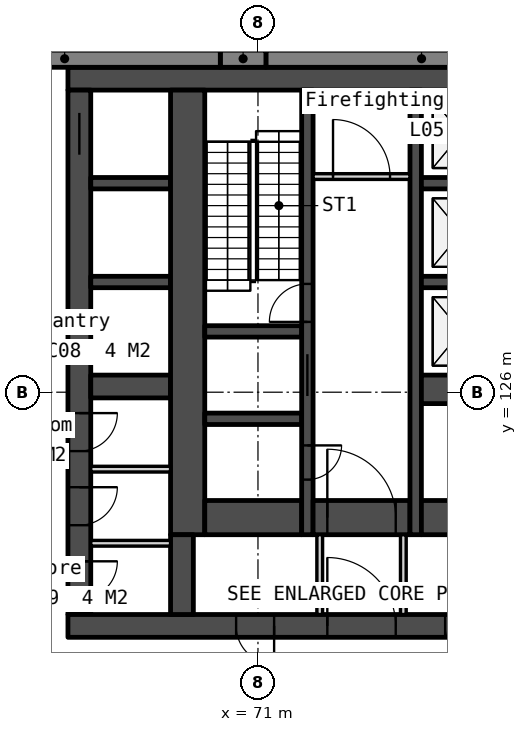
"""IFC4 building model, lengths in metres.
Left out: names, types, materials, properties, quantities, classifications, styles, units other than length and angle.
Written with IfcOpenShell. Run it as: python <this file> out.ifc"""

import sys

from ifc_helpers import new_model, si_unit, direction, frame, frame_2d, origin, place, context, subcontext, project, spatial, rectangle, extrude, element, fill, save


model = new_model("IFC4")
c1 = context("Model", 3, precision=1e-05, world=origin(), true_north=direction((0.0, 1.0)))
c2 = subcontext(c1, "Body", "Model", "MODEL_VIEW")
j1 = project(units=[si_unit("LENGTHUNIT", "METRE"), si_unit("PLANEANGLEUNIT", "RADIAN")], contexts=[c1])
p1 = place(None, origin())
s1 = spatial("IfcSite", under=j1, at=p1, CompositionType="ELEMENT")
p2 = place(p1, origin())
s2 = spatial("IfcBuilding", under=s1, at=p2, CompositionType="ELEMENT")
p3 = place(p2, frame((0.0, 0.0, 30.0)))
s3 = spatial("IfcBuildingStorey", under=s2, at=p3, CompositionType="ELEMENT", Elevation=30.0)
p4 = place(p3, frame((66.0, 134.25, 0.0), z_axis=(0.0, 0.0, 1.0), x_axis=(1.0, 0.0, 0.0)))
e1 = element("IfcWall", 1, at=p4, inside=s3, PredefinedType="SOLIDWALL", context=c2, shape_type="SweptSolid", body=[
    extrude(rectangle(XDim=28.0, YDim=0.6, at=frame_2d((14.0, 0.0))), origin(), (0.0, 0.0, 1.0), 4.8),
])
p5 = place(p3, frame((66.3, 133.95, 0.0), z_axis=(0.0, 0.0, 1.0), x_axis=(0.0, -1.0, 0.0)))
e2 = element("IfcWall", 2, at=p5, inside=s3, PredefinedType="SOLIDWALL", context=c2, shape_type="SweptSolid", body=[
    extrude(rectangle(XDim=13.8, YDim=0.6, at=frame_2d((6.9, 0.0))), origin(), (0.0, 0.0, 1.0), 4.8),
])
p6 = place(p5, frame((0.6, 0.0, 0.0)))
e3 = element("IfcOpeningElement", 3, at=p6, cuts=e2, PredefinedType="OPENING", context=c2, shape_type="SweptSolid", body=[
    extrude(rectangle(XDim=1.1, YDim=2.1, at=frame_2d((0.55, 1.05))), frame((0.0, 0.31, 0.0), z_axis=(0.0, -1.0, 0.0), x_axis=(1.0, 0.0, 0.0)), (0.0, 0.0, 1.0), 0.62),
])
p7 = place(p5, frame((12.4, 0.0, 0.0)))
e4 = element("IfcOpeningElement", 4, at=p7, cuts=e2, PredefinedType="OPENING", context=c2, shape_type="SweptSolid", body=[
    extrude(rectangle(XDim=1.0, YDim=2.1, at=frame_2d((0.5, 1.05))), frame((0.0, 0.31, 0.0), z_axis=(0.0, -1.0, 0.0), x_axis=(1.0, 0.0, 0.0)), (0.0, 0.0, 1.0), 0.62),
])
p8 = place(p5, frame((8.5, 0.0, 0.0)))
e5 = element("IfcOpeningElement", 5, at=p8, cuts=e2, PredefinedType="OPENING", context=c2, shape_type="SweptSolid", body=[
    extrude(rectangle(XDim=1.0, YDim=2.1, at=frame_2d((0.5, 1.05))), frame((0.0, 0.31, 0.0), z_axis=(0.0, -1.0, 0.0), x_axis=(1.0, 0.0, 0.0)), (0.0, 0.0, 1.0), 0.62),
])
p9 = place(p5, frame((10.45, 0.0, 0.0)))
e6 = element("IfcOpeningElement", 6, at=p9, cuts=e2, PredefinedType="OPENING", context=c2, shape_type="SweptSolid", body=[
    extrude(rectangle(XDim=1.0, YDim=2.1, at=frame_2d((0.5, 1.05))), frame((0.0, 0.31, 0.0), z_axis=(0.0, -1.0, 0.0), x_axis=(1.0, 0.0, 0.0)), (0.0, 0.0, 1.0), 0.62),
])
p10 = place(p3, frame((66.0, 119.85, 0.0), z_axis=(0.0, 0.0, 1.0), x_axis=(1.0, 0.0, 0.0)))
e7 = element("IfcWall", 7, at=p10, inside=s3, PredefinedType="SOLIDWALL", context=c2, shape_type="SweptSolid", body=[
    extrude(rectangle(XDim=28.0, YDim=0.6, at=frame_2d((14.0, 0.0))), origin(), (0.0, 0.0, 1.0), 4.8),
])
p11 = place(p10, frame((6.825, 0.0, 0.0)))
e8 = element("IfcOpeningElement", 8, at=p11, cuts=e7, PredefinedType="OPENING", context=c2, shape_type="SweptSolid", body=[
    extrude(rectangle(XDim=1.8, YDim=2.1, at=frame_2d((0.9, 1.05))), frame((0.0, 0.31, 0.0), z_axis=(0.0, -1.0, 0.0), x_axis=(1.0, 0.0, 0.0)), (0.0, 0.0, 1.0), 0.62),
])
p12 = place(p10, frame((15.85, 0.0, 0.0)))
e9 = element("IfcOpeningElement", 9, at=p12, cuts=e7, PredefinedType="OPENING", context=c2, shape_type="SweptSolid", body=[
    extrude(rectangle(XDim=1.5, YDim=2.1, at=frame_2d((0.75, 1.05))), frame((0.0, 0.31, 0.0), z_axis=(0.0, -1.0, 0.0), x_axis=(1.0, 0.0, 0.0)), (0.0, 0.0, 1.0), 0.62),
])
p13 = place(p10, frame((19.375, 0.0, 0.0)))
e10 = element("IfcOpeningElement", 10, at=p13, cuts=e7, PredefinedType="OPENING", context=c2, shape_type="SweptSolid", body=[
    extrude(rectangle(XDim=1.8, YDim=2.1, at=frame_2d((0.9, 1.05))), frame((0.0, 0.31, 0.0), z_axis=(0.0, -1.0, 0.0), x_axis=(1.0, 0.0, 0.0)), (0.0, 0.0, 1.0), 0.62),
])
p14 = place(p10, frame((4.425, 0.0, 0.0)))
e11 = element("IfcOpeningElement", 11, at=p14, cuts=e7, PredefinedType="OPENING", context=c2, shape_type="SweptSolid", body=[
    extrude(rectangle(XDim=1.0, YDim=2.1, at=frame_2d((0.5, 1.05))), frame((0.0, 0.31, 0.0), z_axis=(0.0, -1.0, 0.0), x_axis=(1.0, 0.0, 0.0)), (0.0, 0.0, 1.0), 0.62),
])
p15 = place(p10, frame((9.925, 0.0, 0.0)))
e12 = element("IfcOpeningElement", 12, at=p15, cuts=e7, PredefinedType="OPENING", context=c2, shape_type="SweptSolid", body=[
    extrude(rectangle(XDim=1.0, YDim=2.1, at=frame_2d((0.5, 1.05))), frame((0.0, 0.31, 0.0), z_axis=(0.0, -1.0, 0.0), x_axis=(1.0, 0.0, 0.0)), (0.0, 0.0, 1.0), 0.62),
])
p16 = place(p10, frame((13.125, 0.0, 0.0)))
e13 = element("IfcOpeningElement", 13, at=p16, cuts=e7, PredefinedType="OPENING", context=c2, shape_type="SweptSolid", body=[
    extrude(rectangle(XDim=1.0, YDim=2.1, at=frame_2d((0.5, 1.05))), frame((0.0, 0.31, 0.0), z_axis=(0.0, -1.0, 0.0), x_axis=(1.0, 0.0, 0.0)), (0.0, 0.0, 1.0), 0.62),
])
p17 = place(p10, frame((21.725, 0.0, 0.0)))
e14 = element("IfcOpeningElement", 14, at=p17, cuts=e7, PredefinedType="OPENING", context=c2, shape_type="SweptSolid", body=[
    extrude(rectangle(XDim=1.0, YDim=2.1, at=frame_2d((0.5, 1.05))), frame((0.0, 0.31, 0.0), z_axis=(0.0, -1.0, 0.0), x_axis=(1.0, 0.0, 0.0)), (0.0, 0.0, 1.0), 0.62),
])
p18 = place(p10, frame((23.425, 0.0, 0.0)))
e15 = element("IfcOpeningElement", 15, at=p18, cuts=e7, PredefinedType="OPENING", context=c2, shape_type="SweptSolid", body=[
    extrude(rectangle(XDim=1.0, YDim=2.1, at=frame_2d((0.5, 1.05))), frame((0.0, 0.31, 0.0), z_axis=(0.0, -1.0, 0.0), x_axis=(1.0, 0.0, 0.0)), (0.0, 0.0, 1.0), 0.62),
])
for number, where, z_axis, x_axis in (
    (16, (66.6, 131.5, 0.0), (0.0, 0.0, 1.0), (1.0, 0.0, 0.0)),
    (17, (66.6, 128.9, 0.0), (0.0, 0.0, 1.0), (1.0, 0.0, 0.0)),
):
    element("IfcWall", number, at=place(p3, frame(where, z_axis=z_axis, x_axis=x_axis)), inside=s3, PredefinedType="SOLIDWALL", context=c2, shape_type="SweptSolid", body=[
        extrude(rectangle(XDim=2.1, YDim=0.3, at=frame_2d((1.05, 0.0))), origin(), (0.0, 0.0, 1.0), 4.8),
    ])
p19 = place(p3, frame((66.6, 126.15, 0.0), z_axis=(0.0, 0.0, 1.0), x_axis=(1.0, 0.0, 0.0)))
e18 = element("IfcWall", 18, at=p19, inside=s3, PredefinedType="SOLIDWALL", context=c2, shape_type="SweptSolid", body=[
    extrude(rectangle(XDim=2.1, YDim=0.6, at=frame_2d((1.05, 0.0))), origin(), (0.0, 0.0, 1.0), 4.8),
])
for number, where, z_axis, x_axis in (
    (19, (66.6, 123.975, 0.0), (0.0, 0.0, 1.0), (1.0, 0.0, 0.0)),
    (20, (66.6, 122.025, 0.0), (0.0, 0.0, 1.0), (1.0, 0.0, 0.0)),
):
    element("IfcWall", number, at=place(p3, frame(where, z_axis=z_axis, x_axis=x_axis)), inside=s3, PredefinedType="PARTITIONING", context=c2, shape_type="SweptSolid", body=[
        extrude(rectangle(XDim=2.1, YDim=0.15, at=frame_2d((1.05, 0.0))), origin(), (0.0, 0.0, 1.0), 4.8),
    ])
p20 = place(p3, frame((69.15, 133.95, 0.0), z_axis=(0.0, 0.0, 1.0), x_axis=(0.0, -1.0, 0.0)))
e21 = element("IfcWall", 21, at=p20, inside=s3, PredefinedType="SOLIDWALL", context=c2, shape_type="SweptSolid", body=[
    extrude(rectangle(XDim=11.7, YDim=0.9, at=frame_2d((5.85, 0.0))), origin(), (0.0, 0.0, 1.0), 4.8),
])
p21 = place(p3, frame((69.0, 122.25, 0.0), z_axis=(0.0, 0.0, 1.0), x_axis=(0.0, -1.0, 0.0)))
e22 = element("IfcWall", 22, at=p21, inside=s3, PredefinedType="SOLIDWALL", context=c2, shape_type="SweptSolid", body=[
    extrude(rectangle(XDim=2.1, YDim=0.6, at=frame_2d((1.05, 0.0))), origin(), (0.0, 0.0, 1.0), 4.8),
])
for number, where, z_axis, x_axis in (
    (23, (69.6, 127.6, 0.0), (0.0, 0.0, 1.0), (1.0, 0.0, 0.0)),
    (24, (69.6, 125.3, 0.0), (0.0, 0.0, 1.0), (1.0, 0.0, 0.0)),
):
    element("IfcWall", number, at=place(p3, frame(where, z_axis=z_axis, x_axis=x_axis)), inside=s3, PredefinedType="SOLIDWALL", context=c2, shape_type="SweptSolid", body=[
        extrude(rectangle(XDim=2.55, YDim=0.3, at=frame_2d((1.275, 0.0))), origin(), (0.0, 0.0, 1.0), 4.8),
    ])
p22 = place(p3, frame((69.6, 122.7, 0.0), z_axis=(0.0, 0.0, 1.0), x_axis=(1.0, 0.0, 0.0)))
e25 = element("IfcWall", 25, at=p22, inside=s3, PredefinedType="SOLIDWALL", context=c2, shape_type="SweptSolid", body=[
    extrude(rectangle(XDim=2.55, YDim=0.9, at=frame_2d((1.275, 0.0))), origin(), (0.0, 0.0, 1.0), 4.8),
])
p23 = place(p3, frame((72.3, 133.95, 0.0), z_axis=(0.0, 0.0, 1.0), x_axis=(0.0, -1.0, 0.0)))
e26 = element("IfcWall", 26, at=p23, inside=s3, PredefinedType="SOLIDWALL", context=c2, shape_type="SweptSolid", body=[
    extrude(rectangle(XDim=11.7, YDim=0.3, at=frame_2d((5.85, 0.0))), origin(), (0.0, 0.0, 1.0), 4.8),
])
p24 = place(p23, frame((6.95, 0.0, 0.0)))
e27 = element("IfcOpeningElement", 27, at=p24, cuts=e26, PredefinedType="OPENING", context=c2, shape_type="SweptSolid", body=[
    extrude(rectangle(XDim=1.1, YDim=2.1, at=frame_2d((0.55, 1.05))), frame((0.0, 0.16, 0.0), z_axis=(0.0, -1.0, 0.0), x_axis=(1.0, 0.0, 0.0)), (0.0, 0.0, 1.0), 0.32),
])
p25 = place(p23, frame((9.35, 0.0, 0.0)))
e28 = element("IfcOpeningElement", 28, at=p25, cuts=e26, PredefinedType="OPENING", context=c2, shape_type="SweptSolid", body=[
    extrude(rectangle(XDim=0.9, YDim=2.1, at=frame_2d((0.45, 1.05))), frame((0.0, 0.16, 0.0), z_axis=(0.0, -1.0, 0.0), x_axis=(1.0, 0.0, 0.0)), (0.0, 0.0, 1.0), 0.32),
])
p26 = place(p23, frame((5.1, 0.0, 0.0)))
e29 = element("IfcOpeningElement", 29, at=p26, cuts=e26, PredefinedType="OPENING", context=c2, shape_type="SweptSolid", body=[
    extrude(rectangle(XDim=1.0, YDim=2.1, at=frame_2d((0.5, 1.05))), frame((0.0, 0.16, 0.0), z_axis=(0.0, -1.0, 0.0), x_axis=(1.0, 0.0, 0.0)), (0.0, 0.0, 1.0), 0.32),
])
p27 = place(p3, frame((72.45, 131.675, 0.0), z_axis=(0.0, 0.0, 1.0), x_axis=(1.0, 0.0, 0.0)))
e30 = element("IfcWall", 30, at=p27, inside=s3, PredefinedType="PARTITIONING", context=c2, shape_type="SweptSolid", body=[
    extrude(rectangle(XDim=2.55, YDim=0.15, at=frame_2d((1.275, 0.0))), origin(), (0.0, 0.0, 1.0), 4.8),
])
p28 = place(p27, frame((0.525, 0.0, 0.0)))
e31 = element("IfcOpeningElement", 31, at=p28, cuts=e30, PredefinedType="OPENING", context=c2, shape_type="SweptSolid", body=[
    extrude(rectangle(XDim=1.5, YDim=2.1, at=frame_2d((0.75, 1.05))), frame((0.0, 0.085, 0.0), z_axis=(0.0, -1.0, 0.0), x_axis=(1.0, 0.0, 0.0)), (0.0, 0.0, 1.0), 0.17),
])
p29 = place(p3, frame((72.45, 122.7, 0.0), z_axis=(0.0, 0.0, 1.0), x_axis=(1.0, 0.0, 0.0)))
e32 = element("IfcWall", 32, at=p29, inside=s3, PredefinedType="SOLIDWALL", context=c2, shape_type="SweptSolid", body=[
    extrude(rectangle(XDim=2.55, YDim=0.9, at=frame_2d((1.275, 0.0))), origin(), (0.0, 0.0, 1.0), 4.8),
])
p30 = place(p29, frame((0.375, 0.0, 0.0)))
e33 = element("IfcOpeningElement", 33, at=p30, cuts=e32, PredefinedType="OPENING", context=c2, shape_type="SweptSolid", body=[
    extrude(rectangle(XDim=1.8, YDim=2.1, at=frame_2d((0.9, 1.05))), frame((0.0, 0.46, 0.0), z_axis=(0.0, -1.0, 0.0), x_axis=(1.0, 0.0, 0.0)), (0.0, 0.0, 1.0), 0.92),
])
for number, where, z_axis, x_axis in (
    (34, (72.625, 122.25, 0.0), (0.0, 0.0, 1.0), (0.0, -1.0, 0.0)),
    (35, (74.825, 122.25, 0.0), (0.0, 0.0, 1.0), (0.0, -1.0, 0.0)),
):
    element("IfcWall", number, at=place(p3, frame(where, z_axis=z_axis, x_axis=x_axis)), inside=s3, PredefinedType="PARTITIONING", context=c2, shape_type="SweptSolid", body=[
        extrude(rectangle(XDim=2.1, YDim=0.15, at=frame_2d((1.05, 0.0))), origin(), (0.0, 0.0, 1.0), 4.8),
    ])
p31 = place(p3, frame((75.15, 133.95, 0.0), z_axis=(0.0, 0.0, 1.0), x_axis=(0.0, -1.0, 0.0)))
e36 = element("IfcWall", 36, at=p31, inside=s3, PredefinedType="SOLIDWALL", context=c2, shape_type="SweptSolid", body=[
    extrude(rectangle(XDim=11.7, YDim=0.3, at=frame_2d((5.85, 0.0))), origin(), (0.0, 0.0, 1.0), 4.8),
])
for number, where, z_axis, x_axis in (
    (37, (75.3, 131.5, 0.0), (0.0, 0.0, 1.0), (1.0, 0.0, 0.0)),
    (38, (75.3, 128.9, 0.0), (0.0, 0.0, 1.0), (1.0, 0.0, 0.0)),
):
    element("IfcWall", number, at=place(p3, frame(where, z_axis=z_axis, x_axis=x_axis)), inside=s3, PredefinedType="SOLIDWALL", context=c2, shape_type="SweptSolid", body=[
        extrude(rectangle(XDim=2.1, YDim=0.3, at=frame_2d((1.05, 0.0))), origin(), (0.0, 0.0, 1.0), 4.8),
    ])
p32 = place(p3, frame((75.3, 126.075, 0.0), z_axis=(0.0, 0.0, 1.0), x_axis=(1.0, 0.0, 0.0)))
e39 = element("IfcWall", 39, at=p32, inside=s3, PredefinedType="SOLIDWALL", context=c2, shape_type="SweptSolid", body=[
    extrude(rectangle(XDim=2.1, YDim=0.75, at=frame_2d((1.05, 0.0))), origin(), (0.0, 0.0, 1.0), 4.8),
])
p33 = place(p3, frame((75.3, 122.7, 0.0), z_axis=(0.0, 0.0, 1.0), x_axis=(1.0, 0.0, 0.0)))
e40 = element("IfcWall", 40, at=p33, inside=s3, PredefinedType="SOLIDWALL", context=c2, shape_type="SweptSolid", body=[
    extrude(rectangle(XDim=6.2, YDim=0.9, at=frame_2d((3.1, 0.0))), origin(), (0.0, 0.0, 1.0), 4.8),
])
p34 = place(p3, frame((79.4, 134.775, -0.3), z_axis=(0.0, 0.0, 1.0), x_axis=(-1.0, 0.0, 0.0)))
e41 = element("IfcWall", 41, at=p34, inside=s3, PredefinedType="SOLIDWALL", context=c2, shape_type="SweptSolid", body=[
    extrude(rectangle(XDim=8.191, YDim=0.45, at=frame_2d((4.096, 0.0))), origin(), (0.0, 0.0, 1.0), 4.413),
])
p35 = place(p3, frame((71.209, 134.775, -0.3), z_axis=(0.0, 0.0, 1.0), x_axis=(-1.0, 0.0, 0.0)))
e42 = element("IfcWall", 42, at=p35, inside=s3, PredefinedType="SOLIDWALL", context=c2, shape_type="SweptSolid", body=[
    extrude(rectangle(XDim=1.2, YDim=0.45, at=frame_2d((0.6, 0.0))), origin(), (0.0, 0.0, 1.0), 4.413),
])
p36 = place(p3, frame((70.009, 134.775, -0.3), z_axis=(0.0, 0.0, 1.0), x_axis=(-1.0, 0.0, 0.0)))
e43 = element("IfcWall", 43, at=p36, inside=s3, PredefinedType="SOLIDWALL", context=c2, shape_type="SweptSolid", body=[
    extrude(rectangle(XDim=8.191, YDim=0.45, at=frame_2d((4.096, 0.0))), origin(), (0.0, 0.0, 1.0), 4.413),
])
p37 = place(p3, frame((77.166, 71.679, 0.0), z_axis=(0.0, 0.0, 1.0), x_axis=(-0.500000858155, 0.866024908328, 0.0)))
e44 = element("IfcWall", 44, at=p37, inside=s3, PredefinedType="STANDARD", context=c2, shape_type="SweptSolid", body=[
    extrude(rectangle(XDim=66.294, YDim=1.0, at=frame_2d((33.147, 0.0))), origin(), (0.0, 0.0, 1.0), 0.6),
])
p38 = place(p6, origin())
e45 = element("IfcDoor", 45, at=p38, inside=s3, OperationType="SLIDING_TO_LEFT", PredefinedType="DOOR", context=c2, shape_type="SweptSolid", body=[
    extrude(rectangle(XDim=1.1, YDim=2.1, at=frame_2d((0.55, 1.05))), frame((0.0, 0.025, 0.0), z_axis=(0.0, -1.0, 0.0), x_axis=(1.0, 0.0, 0.0)), (0.0, 0.0, 1.0), 0.05),
])
fill(e3, e45)
p39 = place(p24, origin())
e46 = element("IfcDoor", 46, at=p39, inside=s3, OperationType="SLIDING_TO_LEFT", PredefinedType="DOOR", context=c2, shape_type="SweptSolid", body=[
    extrude(rectangle(XDim=1.1, YDim=2.1, at=frame_2d((0.55, 1.05))), frame((0.0, 0.025, 0.0), z_axis=(0.0, -1.0, 0.0), x_axis=(1.0, 0.0, 0.0)), (0.0, 0.0, 1.0), 0.05),
])
fill(e27, e46)
p40 = place(p30, origin())
e47 = element("IfcDoor", 47, at=p40, inside=s3, OperationType="DOUBLE_DOOR_DOUBLE_SWING", PredefinedType="DOOR", context=c2, shape_type="SweptSolid", body=[
    extrude(rectangle(XDim=1.8, YDim=2.1, at=frame_2d((0.9, 1.05))), frame((0.0, 0.025, 0.0), z_axis=(0.0, -1.0, 0.0), x_axis=(1.0, 0.0, 0.0)), (0.0, 0.0, 1.0), 0.05),
])
fill(e33, e47)
p41 = place(p11, origin())
e48 = element("IfcDoor", 48, at=p41, inside=s3, OperationType="DOUBLE_DOOR_DOUBLE_SWING", PredefinedType="DOOR", context=c2, shape_type="SweptSolid", body=[
    extrude(rectangle(XDim=1.8, YDim=2.1, at=frame_2d((0.9, 1.05))), frame((0.0, 0.025, 0.0), z_axis=(0.0, -1.0, 0.0), x_axis=(1.0, 0.0, 0.0)), (0.0, 0.0, 1.0), 0.05),
])
fill(e8, e48)
p42 = place(p28, origin())
e49 = element("IfcDoor", 49, at=p42, inside=s3, OperationType="DOUBLE_DOOR_DOUBLE_SWING", PredefinedType="DOOR", context=c2, shape_type="SweptSolid", body=[
    extrude(rectangle(XDim=1.5, YDim=2.1, at=frame_2d((0.75, 1.05))), frame((0.0, 0.025, 0.0), z_axis=(0.0, -1.0, 0.0), x_axis=(1.0, 0.0, 0.0)), (0.0, 0.0, 1.0), 0.05),
])
fill(e31, e49)
p43 = place(p25, origin())
e50 = element("IfcDoor", 50, at=p43, inside=s3, OperationType="SINGLE_SWING_LEFT", PredefinedType="DOOR", context=c2, shape_type="SweptSolid", body=[
    extrude(rectangle(XDim=0.9, YDim=2.1, at=frame_2d((0.45, 1.05))), frame((0.0, 0.025, 0.0), z_axis=(0.0, -1.0, 0.0), x_axis=(1.0, 0.0, 0.0)), (0.0, 0.0, 1.0), 0.05),
])
fill(e28, e50)
p44 = place(p14, origin())
e51 = element("IfcDoor", 51, at=p44, inside=s3, OperationType="SINGLE_SWING_RIGHT", PredefinedType="DOOR", context=c2, shape_type="SweptSolid", body=[
    extrude(rectangle(XDim=1.0, YDim=2.1, at=frame_2d((0.5, 1.05))), frame((0.0, 0.025, 0.0), z_axis=(0.0, -1.0, 0.0), x_axis=(1.0, 0.0, 0.0)), (0.0, 0.0, 1.0), 0.05),
])
fill(e11, e51)
p45 = place(p15, origin())
e52 = element("IfcDoor", 52, at=p45, inside=s3, OperationType="SINGLE_SWING_RIGHT", PredefinedType="DOOR", context=c2, shape_type="SweptSolid", body=[
    extrude(rectangle(XDim=1.0, YDim=2.1, at=frame_2d((0.5, 1.05))), frame((0.0, 0.025, 0.0), z_axis=(0.0, -1.0, 0.0), x_axis=(1.0, 0.0, 0.0)), (0.0, 0.0, 1.0), 0.05),
])
fill(e12, e52)
p46 = place(p26, origin())
e53 = element("IfcDoor", 53, at=p46, inside=s3, OperationType="SINGLE_SWING_RIGHT", PredefinedType="DOOR", context=c2, shape_type="SweptSolid", body=[
    extrude(rectangle(XDim=1.0, YDim=2.1, at=frame_2d((0.5, 1.05))), frame((0.0, 0.025, 0.0), z_axis=(0.0, -1.0, 0.0), x_axis=(1.0, 0.0, 0.0)), (0.0, 0.0, 1.0), 0.05),
])
fill(e29, e53)
p47 = place(p7, origin())
e54 = element("IfcDoor", 54, at=p47, inside=s3, OperationType="SINGLE_SWING_LEFT", PredefinedType="DOOR", context=c2, shape_type="SweptSolid", body=[
    extrude(rectangle(XDim=1.0, YDim=2.1, at=frame_2d((0.5, 1.05))), frame((0.0, 0.025, 0.0), z_axis=(0.0, -1.0, 0.0), x_axis=(1.0, 0.0, 0.0)), (0.0, 0.0, 1.0), 0.05),
])
fill(e4, e54)
p48 = place(p8, origin())
e55 = element("IfcDoor", 55, at=p48, inside=s3, OperationType="SINGLE_SWING_LEFT", PredefinedType="DOOR", context=c2, shape_type="SweptSolid", body=[
    extrude(rectangle(XDim=1.0, YDim=2.1, at=frame_2d((0.5, 1.05))), frame((0.0, 0.025, 0.0), z_axis=(0.0, -1.0, 0.0), x_axis=(1.0, 0.0, 0.0)), (0.0, 0.0, 1.0), 0.05),
])
fill(e5, e55)
p49 = place(p9, origin())
e56 = element("IfcDoor", 56, at=p49, inside=s3, OperationType="SINGLE_SWING_LEFT", PredefinedType="DOOR", context=c2, shape_type="SweptSolid", body=[
    extrude(rectangle(XDim=1.0, YDim=2.1, at=frame_2d((0.5, 1.05))), frame((0.0, 0.025, 0.0), z_axis=(0.0, -1.0, 0.0), x_axis=(1.0, 0.0, 0.0)), (0.0, 0.0, 1.0), 0.05),
])
fill(e6, e56)
save(model, sys.argv[1])
